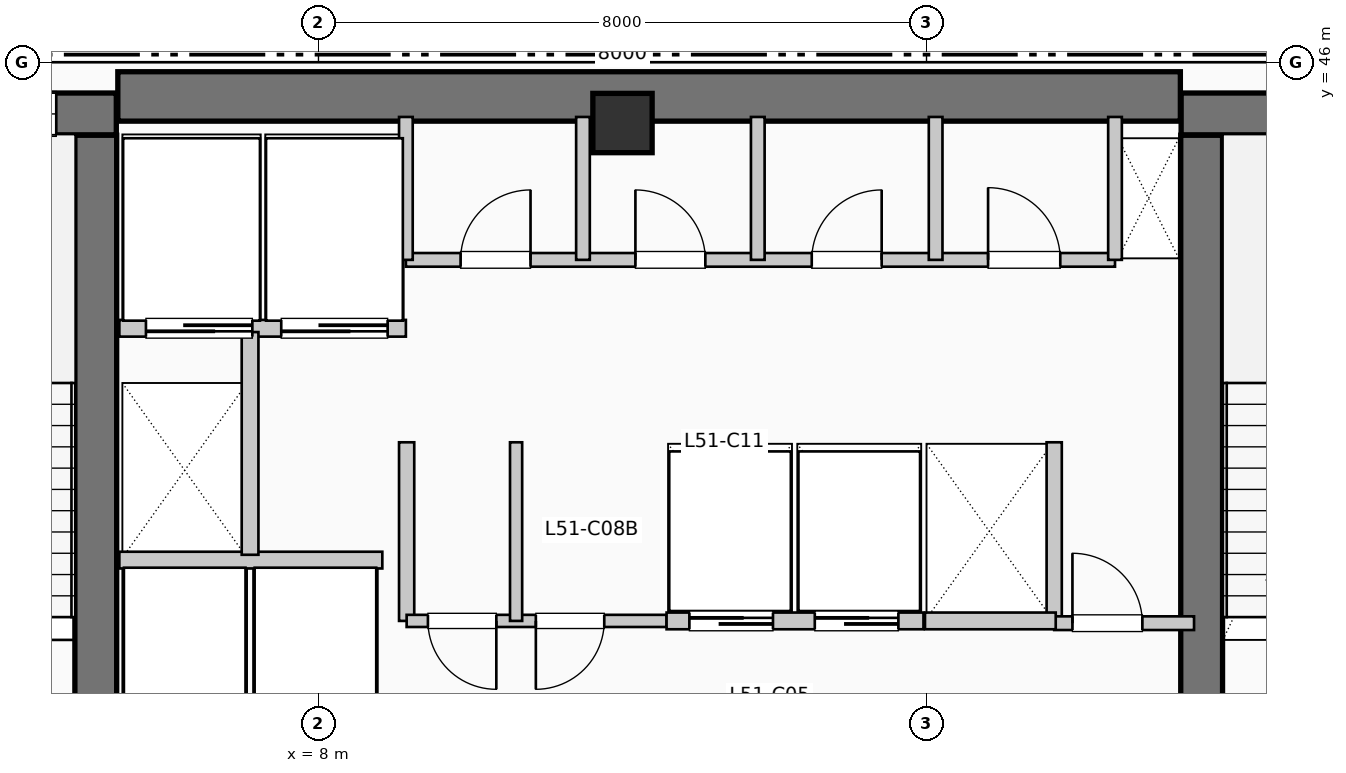
"""IFC4 building model, lengths in metres.
Left out: names, types, materials, properties, quantities, classifications, styles, units other than length and angle.
Written with IfcOpenShell. Run it as: python <this file> out.ifc"""

import sys

from ifc_helpers import new_model, si_unit, direction, frame, frame_2d, origin, origin_2d, place, context, subcontext, project, spatial, rectangle, extrude, element, fill, save


model = new_model("IFC4")
c1 = context("Model", 3, precision=1e-05, world=origin(), true_north=direction((0.0, 1.0)))
c2 = subcontext(c1, "Body", "Model", "MODEL_VIEW")
j1 = project(units=[si_unit("LENGTHUNIT", "METRE"), si_unit("PLANEANGLEUNIT", "RADIAN")], contexts=[c1])
p1 = place(None, origin())
s1 = spatial("IfcSite", under=j1, at=p1, CompositionType="ELEMENT")
p2 = place(p1, origin())
s2 = spatial("IfcBuilding", under=s1, at=p2, CompositionType="ELEMENT")
p3 = place(p2, frame((0.0, 0.0, 211.2)))
s3 = spatial("IfcBuildingStorey", under=s2, at=p3, CompositionType="ELEMENT", Elevation=211.2)
p4 = place(p3, frame((5.36, 45.55, 0.0), z_axis=(0.0, 0.0, 1.0), x_axis=(1.0, 0.0, 0.0)))
e1 = element("IfcWall", 1, at=p4, inside=s3, PredefinedType="SHEAR", context=c2, shape_type="SweptSolid", body=[
    extrude(rectangle(XDim=13.98, YDim=0.65, at=frame_2d((6.99, 0.0))), origin(), (0.0, 0.0, 1.0), 3.96),
])
p5 = place(p3, frame((5.07, 37.15, 0.0), z_axis=(0.0, 0.0, 1.0), x_axis=(0.0, 1.0, 0.0)))
e2 = element("IfcWall", 2, at=p5, inside=s3, PredefinedType="SHEAR", context=c2, shape_type="SweptSolid", body=[
    extrude(rectangle(XDim=7.89, YDim=0.55, at=frame_2d((3.945, 0.0))), origin(), (0.0, 0.0, 1.0), 3.96),
])
p6 = place(p3, frame((1.1, 45.32, 0.0), z_axis=(0.0, 0.0, 1.0), x_axis=(1.0, 0.0, 0.0)))
e3 = element("IfcWall", 3, at=p6, inside=s3, PredefinedType="SHEAR", context=c2, shape_type="SweptSolid", body=[
    extrude(rectangle(XDim=4.24, YDim=0.55, at=frame_2d((2.12, 0.0))), origin(), (0.0, 0.0, 1.0), 3.96),
])
p7 = place(p6, frame((2.05, 0.0, 1.05)))
e4 = element("IfcOpeningElement", 4, at=p7, cuts=e3, PredefinedType="OPENING", context=c2, shape_type="SweptSolid", body=[
    extrude(rectangle(XDim=1.4, YDim=1.8, at=frame_2d((0.7, 0.9))), frame((0.0, 0.285, 0.0), z_axis=(0.0, -1.0, 0.0), x_axis=(1.0, 0.0, 0.0)), (0.0, 0.0, 1.0), 0.57),
])
p8 = place(p3, frame((19.62, 37.15, 0.0), z_axis=(0.0, 0.0, 1.0), x_axis=(0.0, 1.0, 0.0)))
e5 = element("IfcWall", 5, at=p8, inside=s3, PredefinedType="SHEAR", context=c2, shape_type="SweptSolid", body=[
    extrude(rectangle(XDim=7.89, YDim=0.55, at=frame_2d((3.945, 0.0))), origin(), (0.0, 0.0, 1.0), 3.96),
])
p9 = place(p3, frame((19.35, 45.32, 0.0), z_axis=(0.0, 0.0, 1.0), x_axis=(1.0, 0.0, 0.0)))
e6 = element("IfcWall", 6, at=p9, inside=s3, PredefinedType="SHEAR", context=c2, shape_type="SweptSolid", body=[
    extrude(rectangle(XDim=3.69, YDim=0.55, at=frame_2d((1.845, 0.0))), origin(), (0.0, 0.0, 1.0), 3.96),
])
p10 = place(p9, frame((1.15, 0.0, 1.05)))
e7 = element("IfcOpeningElement", 7, at=p10, cuts=e6, PredefinedType="OPENING", context=c2, shape_type="SweptSolid", body=[
    extrude(rectangle(XDim=1.4, YDim=1.8, at=frame_2d((0.7, 0.9))), frame((0.0, 0.285, 0.0), z_axis=(0.0, -1.0, 0.0), x_axis=(1.0, 0.0, 0.0)), (0.0, 0.0, 1.0), 0.57),
])
p11 = place(p3, frame((12.0, 45.2, 0.0), z_axis=(0.0, 0.0, 1.0), x_axis=(1.0, 0.0, 0.0)))
e8 = element("IfcColumn", 8, at=p11, inside=s3, PredefinedType="COLUMN", context=c2, shape_type="SweptSolid", body=[
    extrude(rectangle(XDim=0.78, YDim=0.78, at=origin_2d()), origin(), (0.0, 0.0, 1.0), 3.96),
])
p12 = place(p3, frame((5.38, 39.45, 0.0), z_axis=(0.0, 0.0, 1.0), x_axis=(1.0, 0.0, 0.0)))
e9 = element("IfcWall", 9, at=p12, inside=s3, PredefinedType="PARTITIONING", context=c2, shape_type="SweptSolid", body=[
    extrude(rectangle(XDim=3.46, YDim=0.22, at=frame_2d((1.73, 0.0))), origin(), (0.0, 0.0, 1.0), 3.71),
])
p13 = place(p3, frame((5.38, 42.5, 0.0), z_axis=(0.0, 0.0, 1.0), x_axis=(1.0, 0.0, 0.0)))
e10 = element("IfcWall", 10, at=p13, inside=s3, PredefinedType="PARTITIONING", context=c2, shape_type="SweptSolid", body=[
    extrude(rectangle(XDim=3.77, YDim=0.22, at=frame_2d((1.885, 0.0))), origin(), (0.0, 0.0, 1.0), 3.71),
])
p14 = place(p13, frame((1.75, 0.0, 0.0), z_axis=(0.0, 0.0, 1.0), x_axis=(-1.0, 0.0, 0.0)))
e11 = element("IfcOpeningElement", 11, at=p14, cuts=e10, PredefinedType="OPENING", context=c2, shape_type="SweptSolid", body=[
    extrude(rectangle(XDim=1.4, YDim=2.2, at=frame_2d((0.7, 1.1))), frame((0.0, 0.12, 0.0), z_axis=(0.0, -1.0, 0.0), x_axis=(1.0, 0.0, 0.0)), (0.0, 0.0, 1.0), 0.24),
])
p15 = place(p13, frame((3.53, 0.0, 0.0), z_axis=(0.0, 0.0, 1.0), x_axis=(-1.0, 0.0, 0.0)))
e12 = element("IfcOpeningElement", 12, at=p15, cuts=e10, PredefinedType="OPENING", context=c2, shape_type="SweptSolid", body=[
    extrude(rectangle(XDim=1.4, YDim=2.2, at=frame_2d((0.7, 1.1))), frame((0.0, 0.12, 0.0), z_axis=(0.0, -1.0, 0.0), x_axis=(1.0, 0.0, 0.0)), (0.0, 0.0, 1.0), 0.24),
])
p16 = place(p3, frame((7.1, 39.52, 0.0), z_axis=(0.0, 0.0, 1.0), x_axis=(0.0, 1.0, 0.0)))
e13 = element("IfcWall", 13, at=p16, inside=s3, PredefinedType="PARTITIONING", context=c2, shape_type="SweptSolid", body=[
    extrude(rectangle(XDim=2.93, YDim=0.22, at=frame_2d((1.465, 0.0))), origin(), (0.0, 0.0, 1.0), 3.71),
])
for number, where, z_axis, x_axis in (
    (14, (9.16, 38.65, 0.0), (0.0, 0.0, 1.0), (0.0, 1.0, 0.0)),
    (15, (17.68, 38.65, 0.0), (0.0, 0.0, 1.0), (0.0, 1.0, 0.0)),
):
    element("IfcWall", number, at=place(p3, frame(where, z_axis=z_axis, x_axis=x_axis)), inside=s3, PredefinedType="PARTITIONING", context=c2, shape_type="SweptSolid", body=[
        extrude(rectangle(XDim=2.35, YDim=0.2, at=frame_2d((1.175, 0.0))), origin(), (0.0, 0.0, 1.0), 3.71),
    ])
p17 = place(p3, frame((17.68, 38.62, 0.0), z_axis=(0.0, 0.0, 1.0), x_axis=(1.0, 0.0, 0.0)))
e16 = element("IfcWall", 16, at=p17, inside=s3, PredefinedType="PARTITIONING", context=c2, shape_type="SweptSolid", body=[
    extrude(rectangle(XDim=1.84, YDim=0.18, at=frame_2d((0.92, 0.0))), origin(), (0.0, 0.0, 1.0), 3.71),
])
p18 = place(p17, frame((0.24, 0.0, 0.0)))
e17 = element("IfcOpeningElement", 17, at=p18, cuts=e16, PredefinedType="OPENING", context=c2, shape_type="SweptSolid", body=[
    extrude(rectangle(XDim=0.92, YDim=2.1, at=frame_2d((0.46, 1.05))), frame((0.0, 0.1, 0.0), z_axis=(0.0, -1.0, 0.0), x_axis=(1.0, 0.0, 0.0)), (0.0, 0.0, 1.0), 0.2),
])
p19 = place(p3, frame((9.16, 38.65, 0.0), z_axis=(0.0, 0.0, 1.0), x_axis=(1.0, 0.0, 0.0)))
e18 = element("IfcWall", 18, at=p19, inside=s3, PredefinedType="PARTITIONING", context=c2, shape_type="SweptSolid", body=[
    extrude(rectangle(XDim=3.42, YDim=0.16, at=frame_2d((1.71, 0.0))), origin(), (0.0, 0.0, 1.0), 3.71),
])
p20 = place(p19, frame((1.18, 0.0, 0.0), z_axis=(0.0, 0.0, 1.0), x_axis=(-1.0, 0.0, 0.0)))
e19 = element("IfcOpeningElement", 19, at=p20, cuts=e18, PredefinedType="OPENING", context=c2, shape_type="SweptSolid", body=[
    extrude(rectangle(XDim=0.9, YDim=2.15, at=frame_2d((0.45, 1.075))), frame((0.0, 0.09, 0.0), z_axis=(0.0, -1.0, 0.0), x_axis=(1.0, 0.0, 0.0)), (0.0, 0.0, 1.0), 0.18),
])
p21 = place(p19, frame((2.6, 0.0, 0.0), z_axis=(0.0, 0.0, 1.0), x_axis=(-1.0, 0.0, 0.0)))
e20 = element("IfcOpeningElement", 20, at=p21, cuts=e18, PredefinedType="OPENING", context=c2, shape_type="SweptSolid", body=[
    extrude(rectangle(XDim=0.9, YDim=2.15, at=frame_2d((0.45, 1.075))), frame((0.0, 0.09, 0.0), z_axis=(0.0, -1.0, 0.0), x_axis=(1.0, 0.0, 0.0)), (0.0, 0.0, 1.0), 0.18),
])
p22 = place(p3, frame((10.6, 38.65, 0.0), z_axis=(0.0, 0.0, 1.0), x_axis=(0.0, 1.0, 0.0)))
e21 = element("IfcWall", 21, at=p22, inside=s3, PredefinedType="PARTITIONING", context=c2, shape_type="SweptSolid", body=[
    extrude(rectangle(XDim=2.35, YDim=0.16, at=frame_2d((1.175, 0.0))), origin(), (0.0, 0.0, 1.0), 3.71),
])
p23 = place(p3, frame((12.58, 38.65, 0.0), z_axis=(0.0, 0.0, 1.0), x_axis=(1.0, 0.0, 0.0)))
e22 = element("IfcWall", 22, at=p23, inside=s3, PredefinedType="PARTITIONING", context=c2, shape_type="SweptSolid", body=[
    extrude(rectangle(XDim=3.38, YDim=0.22, at=frame_2d((1.69, 0.0))), origin(), (0.0, 0.0, 1.0), 3.71),
])
p24 = place(p23, frame((0.3, 0.0, 0.0)))
e23 = element("IfcOpeningElement", 23, at=p24, cuts=e22, PredefinedType="OPENING", context=c2, shape_type="SweptSolid", body=[
    extrude(rectangle(XDim=1.1, YDim=2.2, at=frame_2d((0.55, 1.1))), frame((0.0, 0.12, 0.0), z_axis=(0.0, -1.0, 0.0), x_axis=(1.0, 0.0, 0.0)), (0.0, 0.0, 1.0), 0.24),
])
p25 = place(p23, frame((1.95, 0.0, 0.0)))
e24 = element("IfcOpeningElement", 24, at=p25, cuts=e22, PredefinedType="OPENING", context=c2, shape_type="SweptSolid", body=[
    extrude(rectangle(XDim=1.1, YDim=2.2, at=frame_2d((0.55, 1.1))), frame((0.0, 0.12, 0.0), z_axis=(0.0, -1.0, 0.0), x_axis=(1.0, 0.0, 0.0)), (0.0, 0.0, 1.0), 0.24),
])
p26 = place(p3, frame((15.98, 38.65, 0.0), z_axis=(0.0, 0.0, 1.0), x_axis=(1.0, 0.0, 0.0)))
e25 = element("IfcWall", 25, at=p26, inside=s3, PredefinedType="PARTITIONING", context=c2, shape_type="SweptSolid", body=[
    extrude(rectangle(XDim=1.72, YDim=0.22, at=frame_2d((0.86, 0.0))), origin(), (0.0, 0.0, 1.0), 3.71),
])
p27 = place(p3, frame((9.15, 43.4, 0.0), z_axis=(0.0, 0.0, 1.0), x_axis=(1.0, 0.0, 0.0)))
e26 = element("IfcWall", 26, at=p27, inside=s3, PredefinedType="PLUMBINGWALL", context=c2, shape_type="SweptSolid", body=[
    extrude(rectangle(XDim=9.33, YDim=0.18, at=frame_2d((4.665, 0.0))), origin(), (0.0, 0.0, 1.0), 3.71),
])
p28 = place(p27, frame((0.72, 0.0, 0.0)))
e27 = element("IfcOpeningElement", 27, at=p28, cuts=e26, PredefinedType="OPENING", context=c2, shape_type="SweptSolid", body=[
    extrude(rectangle(XDim=0.92, YDim=2.1, at=frame_2d((0.46, 1.05))), frame((0.0, 0.1, 0.0), z_axis=(0.0, -1.0, 0.0), x_axis=(1.0, 0.0, 0.0)), (0.0, 0.0, 1.0), 0.2),
])
p29 = place(p27, frame((3.02, 0.0, 0.0)))
e28 = element("IfcOpeningElement", 28, at=p29, cuts=e26, PredefinedType="OPENING", context=c2, shape_type="SweptSolid", body=[
    extrude(rectangle(XDim=0.92, YDim=2.1, at=frame_2d((0.46, 1.05))), frame((0.0, 0.1, 0.0), z_axis=(0.0, -1.0, 0.0), x_axis=(1.0, 0.0, 0.0)), (0.0, 0.0, 1.0), 0.2),
])
p30 = place(p27, frame((5.34, 0.0, 0.0)))
e29 = element("IfcOpeningElement", 29, at=p30, cuts=e26, PredefinedType="OPENING", context=c2, shape_type="SweptSolid", body=[
    extrude(rectangle(XDim=0.92, YDim=2.1, at=frame_2d((0.46, 1.05))), frame((0.0, 0.1, 0.0), z_axis=(0.0, -1.0, 0.0), x_axis=(1.0, 0.0, 0.0)), (0.0, 0.0, 1.0), 0.2),
])
p31 = place(p27, frame((7.66, 0.0, 0.0)))
e30 = element("IfcOpeningElement", 30, at=p31, cuts=e26, PredefinedType="OPENING", context=c2, shape_type="SweptSolid", body=[
    extrude(rectangle(XDim=0.95, YDim=2.1, at=frame_2d((0.475, 1.05))), frame((0.0, 0.1, 0.0), z_axis=(0.0, -1.0, 0.0), x_axis=(1.0, 0.0, 0.0)), (0.0, 0.0, 1.0), 0.2),
])
for number, where, z_axis, x_axis in (
    (31, (9.15, 43.4, 0.0), (0.0, 0.0, 1.0), (0.0, 1.0, 0.0)),
    (32, (18.48, 43.4, 0.0), (0.0, 0.0, 1.0), (0.0, 1.0, 0.0)),
    (33, (11.48, 43.4, 0.0), (0.0, 0.0, 1.0), (0.0, 1.0, 0.0)),
    (34, (13.78, 43.4, 0.0), (0.0, 0.0, 1.0), (0.0, 1.0, 0.0)),
    (35, (16.12, 43.4, 0.0), (0.0, 0.0, 1.0), (0.0, 1.0, 0.0)),
):
    element("IfcWall", number, at=place(p3, frame(where, z_axis=z_axis, x_axis=x_axis)), inside=s3, PredefinedType="PLUMBINGWALL", context=c2, shape_type="SweptSolid", body=[
        extrude(rectangle(XDim=1.88, YDim=0.18, at=frame_2d((0.94, 0.0))), origin(), (0.0, 0.0, 1.0), 3.71),
    ])
p32 = place(p7, origin())
e36 = element("IfcWindow", 36, at=p32, inside=s3, PartitioningType="SINGLE_PANEL", PredefinedType="WINDOW", context=c2, shape_type="SweptSolid", body=[
    extrude(rectangle(XDim=1.4, YDim=1.8, at=frame_2d((0.7, 0.9))), frame((0.0, 0.03, 0.0), z_axis=(0.0, -1.0, 0.0), x_axis=(1.0, 0.0, 0.0)), (0.0, 0.0, 1.0), 0.06),
])
fill(e4, e36)
p33 = place(p14, origin())
e37 = element("IfcDoor", 37, at=p33, inside=s3, OperationType="SLIDING_TO_LEFT", PredefinedType="DOOR", context=c2, shape_type="SweptSolid", body=[
    extrude(rectangle(XDim=1.4, YDim=2.2, at=frame_2d((0.7, 1.1))), frame((0.0, 0.025, 0.0), z_axis=(0.0, -1.0, 0.0), x_axis=(1.0, 0.0, 0.0)), (0.0, 0.0, 1.0), 0.05),
])
fill(e11, e37)
p34 = place(p15, origin())
e38 = element("IfcDoor", 38, at=p34, inside=s3, OperationType="SLIDING_TO_LEFT", PredefinedType="DOOR", context=c2, shape_type="SweptSolid", body=[
    extrude(rectangle(XDim=1.4, YDim=2.2, at=frame_2d((0.7, 1.1))), frame((0.0, 0.025, 0.0), z_axis=(0.0, -1.0, 0.0), x_axis=(1.0, 0.0, 0.0)), (0.0, 0.0, 1.0), 0.05),
])
fill(e12, e38)
p35 = place(p18, origin())
e39 = element("IfcDoor", 39, at=p35, inside=s3, OperationType="SINGLE_SWING_LEFT", PredefinedType="DOOR", context=c2, shape_type="SweptSolid", body=[
    extrude(rectangle(XDim=0.92, YDim=2.1, at=frame_2d((0.46, 1.05))), frame((0.0, 0.025, 0.0), z_axis=(0.0, -1.0, 0.0), x_axis=(1.0, 0.0, 0.0)), (0.0, 0.0, 1.0), 0.05),
])
fill(e17, e39)
p36 = place(p20, origin())
e40 = element("IfcDoor", 40, at=p36, inside=s3, OperationType="SINGLE_SWING_RIGHT", PredefinedType="DOOR", context=c2, shape_type="SweptSolid", body=[
    extrude(rectangle(XDim=0.9, YDim=2.15, at=frame_2d((0.45, 1.075))), frame((0.0, 0.025, 0.0), z_axis=(0.0, -1.0, 0.0), x_axis=(1.0, 0.0, 0.0)), (0.0, 0.0, 1.0), 0.05),
])
fill(e19, e40)
p37 = place(p21, origin())
e41 = element("IfcDoor", 41, at=p37, inside=s3, OperationType="SINGLE_SWING_LEFT", PredefinedType="DOOR", context=c2, shape_type="SweptSolid", body=[
    extrude(rectangle(XDim=0.9, YDim=2.15, at=frame_2d((0.45, 1.075))), frame((0.0, 0.025, 0.0), z_axis=(0.0, -1.0, 0.0), x_axis=(1.0, 0.0, 0.0)), (0.0, 0.0, 1.0), 0.05),
])
fill(e20, e41)
p38 = place(p24, origin())
e42 = element("IfcDoor", 42, at=p38, inside=s3, OperationType="SLIDING_TO_RIGHT", PredefinedType="DOOR", context=c2, shape_type="SweptSolid", body=[
    extrude(rectangle(XDim=1.1, YDim=2.2, at=frame_2d((0.55, 1.1))), frame((0.0, 0.025, 0.0), z_axis=(0.0, -1.0, 0.0), x_axis=(1.0, 0.0, 0.0)), (0.0, 0.0, 1.0), 0.05),
])
fill(e23, e42)
p39 = place(p25, origin())
e43 = element("IfcDoor", 43, at=p39, inside=s3, OperationType="SLIDING_TO_RIGHT", PredefinedType="DOOR", context=c2, shape_type="SweptSolid", body=[
    extrude(rectangle(XDim=1.1, YDim=2.2, at=frame_2d((0.55, 1.1))), frame((0.0, 0.025, 0.0), z_axis=(0.0, -1.0, 0.0), x_axis=(1.0, 0.0, 0.0)), (0.0, 0.0, 1.0), 0.05),
])
fill(e24, e43)
p40 = place(p28, origin())
e44 = element("IfcDoor", 44, at=p40, inside=s3, OperationType="SINGLE_SWING_RIGHT", PredefinedType="DOOR", context=c2, shape_type="SweptSolid", body=[
    extrude(rectangle(XDim=0.92, YDim=2.1, at=frame_2d((0.46, 1.05))), frame((0.0, 0.025, 0.0), z_axis=(0.0, -1.0, 0.0), x_axis=(1.0, 0.0, 0.0)), (0.0, 0.0, 1.0), 0.05),
])
fill(e27, e44)
p41 = place(p29, origin())
e45 = element("IfcDoor", 45, at=p41, inside=s3, OperationType="SINGLE_SWING_LEFT", PredefinedType="DOOR", context=c2, shape_type="SweptSolid", body=[
    extrude(rectangle(XDim=0.92, YDim=2.1, at=frame_2d((0.46, 1.05))), frame((0.0, 0.025, 0.0), z_axis=(0.0, -1.0, 0.0), x_axis=(1.0, 0.0, 0.0)), (0.0, 0.0, 1.0), 0.05),
])
fill(e28, e45)
p42 = place(p30, origin())
e46 = element("IfcDoor", 46, at=p42, inside=s3, OperationType="SINGLE_SWING_RIGHT", PredefinedType="DOOR", context=c2, shape_type="SweptSolid", body=[
    extrude(rectangle(XDim=0.92, YDim=2.1, at=frame_2d((0.46, 1.05))), frame((0.0, 0.025, 0.0), z_axis=(0.0, -1.0, 0.0), x_axis=(1.0, 0.0, 0.0)), (0.0, 0.0, 1.0), 0.05),
])
fill(e29, e46)
p43 = place(p31, origin())
e47 = element("IfcDoor", 47, at=p43, inside=s3, OperationType="SINGLE_SWING_LEFT", PredefinedType="DOOR", context=c2, shape_type="SweptSolid", body=[
    extrude(rectangle(XDim=0.95, YDim=2.1, at=frame_2d((0.475, 1.05))), frame((0.0, 0.025, 0.0), z_axis=(0.0, -1.0, 0.0), x_axis=(1.0, 0.0, 0.0)), (0.0, 0.0, 1.0), 0.05),
])
fill(e30, e47)
save(model, sys.argv[1])
